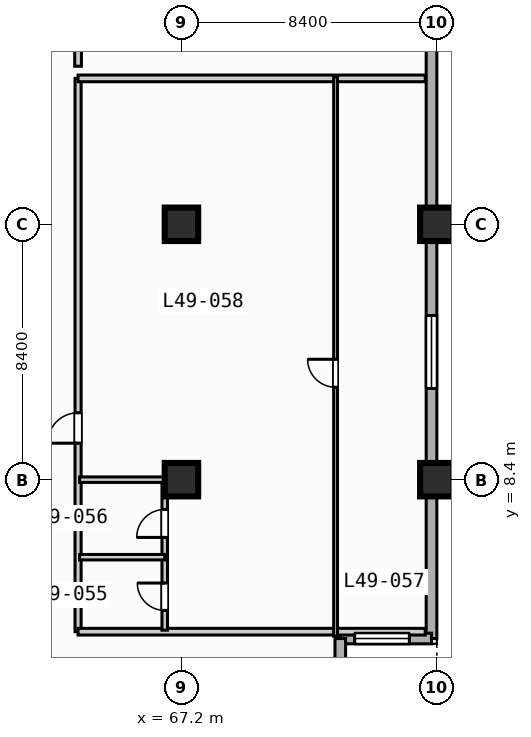
"""IFC4 building model, lengths in metres.
Left out: names, types, materials, properties, quantities, classifications, styles, units other than length and angle.
Written with IfcOpenShell. Run it as: python <this file> out.ifc"""

import sys

from ifc_helpers import new_model, si_unit, direction, frame, frame_2d, origin, origin_2d, place, context, subcontext, project, spatial, rectangle, extrude, element, fill, save


model = new_model("IFC4")
c1 = context("Model", 3, precision=1e-05, world=origin(), true_north=direction((0.0, 1.0)))
c2 = subcontext(c1, "Body", "Model", "MODEL_VIEW")
j1 = project(units=[si_unit("LENGTHUNIT", "METRE"), si_unit("PLANEANGLEUNIT", "RADIAN")], contexts=[c1])
p1 = place(None, origin())
s1 = spatial("IfcSite", under=j1, at=p1, CompositionType="ELEMENT")
p2 = place(p1, origin())
s2 = spatial("IfcBuilding", under=s1, at=p2, CompositionType="ELEMENT")
p3 = place(p2, frame((0.0, 0.0, 201.3)))
s3 = spatial("IfcBuildingStorey", under=s2, at=p3, CompositionType="ELEMENT", Elevation=201.3)
for number, where, z_axis, x_axis in (
    (1, (67.2, 8.4, 0.0), (0.0, 0.0, 1.0), (1.0, 0.0, 0.0)),
    (2, (67.2, 16.8, 0.0), (0.0, 0.0, 1.0), (1.0, 0.0, 0.0)),
    (3, (75.6, 8.4, 0.0), (0.0, 0.0, 1.0), (1.0, 0.0, 0.0)),
    (4, (75.6, 16.8, 0.0), (0.0, 0.0, 1.0), (1.0, 0.0, 0.0)),
):
    element("IfcColumn", number, at=place(p3, frame(where, z_axis=z_axis, x_axis=x_axis)), inside=s3, PredefinedType="COLUMN", context=c2, shape_type="SweptSolid", body=[
        extrude(rectangle(XDim=1.1, YDim=1.1, at=origin_2d()), origin(), (0.0, 0.0, 1.0), 3.7),
    ])
p4 = place(p3, frame((75.425, 30.425, 0.0), z_axis=(0.0, 0.0, 1.0), x_axis=(0.0, -1.0, 0.0)))
e5 = element("IfcWall", 5, at=p4, inside=s3, PredefinedType="STANDARD", context=c2, shape_type="SweptSolid", body=[
    extrude(rectangle(XDim=27.25, YDim=0.35, at=frame_2d((13.625, 0.0))), origin(), (0.0, 0.0, 1.0), 3.47),
])
p5 = place(p4, frame((16.625, 0.0, 0.85)))
e6 = element("IfcOpeningElement", 6, at=p5, cuts=e5, PredefinedType="OPENING", context=c2, shape_type="SweptSolid", body=[
    extrude(rectangle(XDim=2.4, YDim=1.95, at=frame_2d((1.2, 0.975))), frame((0.0, 0.185, 0.0), z_axis=(0.0, -1.0, 0.0), x_axis=(1.0, 0.0, 0.0)), (0.0, 0.0, 1.0), 0.37),
])
p6 = place(p3, frame((75.425, 3.175, 0.0), z_axis=(0.0, 0.0, 1.0), x_axis=(-1.0, 0.0, 0.0)))
e7 = element("IfcWall", 7, at=p6, inside=s3, PredefinedType="STANDARD", context=c2, shape_type="SweptSolid", body=[
    extrude(rectangle(XDim=3.0, YDim=0.35, at=frame_2d((1.5, 0.0))), origin(), (0.0, 0.0, 1.0), 3.47),
])
p7 = place(p6, frame((0.728, 0.0, 0.85)))
e8 = element("IfcOpeningElement", 8, at=p7, cuts=e7, PredefinedType="OPENING", context=c2, shape_type="SweptSolid", body=[
    extrude(rectangle(XDim=1.8, YDim=1.8, at=frame_2d((0.9, 0.9))), frame((0.0, 0.185, 0.0), z_axis=(0.0, -1.0, 0.0), x_axis=(1.0, 0.0, 0.0)), (0.0, 0.0, 1.0), 0.37),
])
p8 = place(p3, frame((72.425, 3.175, 0.0), z_axis=(0.0, 0.0, 1.0), x_axis=(0.0, -1.0, 0.0)))
e9 = element("IfcWall", 9, at=p8, inside=s3, PredefinedType="STANDARD", context=c2, shape_type="SweptSolid", body=[
    extrude(rectangle(XDim=3.0, YDim=0.35, at=frame_2d((1.5, 0.0))), origin(), (0.0, 0.0, 1.0), 3.47),
])
p9 = place(p3, frame((63.8, 3.4, 0.0), z_axis=(0.0, 0.0, 1.0), x_axis=(0.0, 1.0, 0.0)))
e10 = element("IfcWall", 10, at=p9, inside=s3, PredefinedType="PARTITIONING", context=c2, shape_type="SweptSolid", body=[
    extrude(rectangle(XDim=18.2, YDim=0.2, at=frame_2d((9.1, 0.0))), origin(), (0.0, 0.0, 1.0), 3.47),
])
p10 = place(p9, frame((6.2, 0.0, 0.0)))
e11 = element("IfcOpeningElement", 11, at=p10, cuts=e10, PredefinedType="OPENING", context=c2, shape_type="SweptSolid", body=[
    extrude(rectangle(XDim=1.0, YDim=2.15, at=frame_2d((0.5, 1.075))), frame((0.0, 0.11, 0.0), z_axis=(0.0, -1.0, 0.0), x_axis=(1.0, 0.0, 0.0)), (0.0, 0.0, 1.0), 0.22),
])
for number, where, z_axis, x_axis in (
    (12, (63.8, 3.4, 0.0), (0.0, 0.0, 1.0), (1.0, 0.0, 0.0)),
    (13, (63.8, 21.6, 0.0), (0.0, 0.0, 1.0), (1.0, 0.0, 0.0)),
):
    element("IfcWall", number, at=place(p3, frame(where, z_axis=z_axis, x_axis=x_axis)), inside=s3, PredefinedType="PARTITIONING", context=c2, shape_type="SweptSolid", body=[
        extrude(rectangle(XDim=11.42, YDim=0.22, at=frame_2d((5.71, 0.0))), origin(), (0.0, 0.0, 1.0), 3.47),
    ])
p11 = place(p3, frame((66.65, 3.45, 0.0), z_axis=(0.0, 0.0, 1.0), x_axis=(0.0, 1.0, 0.0)))
e14 = element("IfcWall", 14, at=p11, inside=s3, PredefinedType="PLUMBINGWALL", context=c2, shape_type="SweptSolid", body=[
    extrude(rectangle(XDim=4.95, YDim=0.18, at=frame_2d((2.475, 0.0))), origin(), (0.0, 0.0, 1.0), 3.47),
])
p12 = place(p11, frame((0.65, 0.0, 0.0)))
e15 = element("IfcOpeningElement", 15, at=p12, cuts=e14, PredefinedType="OPENING", context=c2, shape_type="SweptSolid", body=[
    extrude(rectangle(XDim=0.9, YDim=2.1, at=frame_2d((0.45, 1.05))), frame((0.0, 0.1, 0.0), z_axis=(0.0, -1.0, 0.0), x_axis=(1.0, 0.0, 0.0)), (0.0, 0.0, 1.0), 0.2),
])
p13 = place(p11, frame((3.05, 0.0, 0.0)))
e16 = element("IfcOpeningElement", 16, at=p13, cuts=e14, PredefinedType="OPENING", context=c2, shape_type="SweptSolid", body=[
    extrude(rectangle(XDim=0.92, YDim=2.1, at=frame_2d((0.46, 1.05))), frame((0.0, 0.1, 0.0), z_axis=(0.0, -1.0, 0.0), x_axis=(1.0, 0.0, 0.0)), (0.0, 0.0, 1.0), 0.2),
])
p14 = place(p3, frame((63.85, 5.85, 0.0), z_axis=(0.0, 0.0, 1.0), x_axis=(1.0, 0.0, 0.0)))
e17 = element("IfcWall", 17, at=p14, inside=s3, PredefinedType="PLUMBINGWALL", context=c2, shape_type="SweptSolid", body=[
    extrude(rectangle(XDim=2.8, YDim=0.18, at=frame_2d((1.4, 0.0))), origin(), (0.0, 0.0, 1.0), 3.47),
])
p15 = place(p3, frame((63.85, 8.4, 0.0), z_axis=(0.0, 0.0, 1.0), x_axis=(1.0, 0.0, 0.0)))
e18 = element("IfcWall", 18, at=p15, inside=s3, PredefinedType="PLUMBINGWALL", context=c2, shape_type="SweptSolid", body=[
    extrude(rectangle(XDim=2.8, YDim=0.18, at=frame_2d((1.4, 0.0))), origin(), (0.0, 0.0, 1.0), 2.853),
])
p16 = place(p3, frame((72.27, 3.25, 0.0), z_axis=(0.0, 0.0, 1.0), x_axis=(0.0, 1.0, 0.0)))
e19 = element("IfcWall", 19, at=p16, inside=s3, PredefinedType="PARTITIONING", context=c2, shape_type="SweptSolid", body=[
    extrude(rectangle(XDim=18.4, YDim=0.125, at=frame_2d((9.2, 0.0))), origin(), (0.0, 0.0, 1.0), 3.47),
])
p17 = place(p16, frame((8.19, 0.0, 0.0)))
e20 = element("IfcOpeningElement", 20, at=p17, cuts=e19, PredefinedType="OPENING", context=c2, shape_type="SweptSolid", body=[
    extrude(rectangle(XDim=0.92, YDim=2.1, at=frame_2d((0.46, 1.05))), frame((0.0, 0.073, 0.0), z_axis=(0.0, -1.0, 0.0), x_axis=(1.0, 0.0, 0.0)), (0.0, 0.0, 1.0), 0.145),
])
p18 = place(p3, frame((63.8, 22.0, 0.0), z_axis=(0.0, 0.0, 1.0), x_axis=(0.0, 1.0, 0.0)))
e21 = element("IfcWall", 21, at=p18, inside=s3, PredefinedType="PARTITIONING", context=c2, shape_type="SweptSolid", body=[
    extrude(rectangle(XDim=6.0, YDim=0.22, at=frame_2d((3.0, 0.0))), origin(), (0.0, 0.0, 1.0), 3.47),
])
p19 = place(p5, origin())
e22 = element("IfcWindow", 22, at=p19, inside=s3, PartitioningType="SINGLE_PANEL", PredefinedType="WINDOW", context=c2, shape_type="SweptSolid", body=[
    extrude(rectangle(XDim=2.4, YDim=1.95, at=frame_2d((1.2, 0.975))), frame((0.0, 0.03, 0.0), z_axis=(0.0, -1.0, 0.0), x_axis=(1.0, 0.0, 0.0)), (0.0, 0.0, 1.0), 0.06),
])
fill(e6, e22)
p20 = place(p7, origin())
e23 = element("IfcWindow", 23, at=p20, inside=s3, PartitioningType="SINGLE_PANEL", PredefinedType="WINDOW", context=c2, shape_type="SweptSolid", body=[
    extrude(rectangle(XDim=1.8, YDim=1.8, at=frame_2d((0.9, 0.9))), frame((0.0, 0.03, 0.0), z_axis=(0.0, -1.0, 0.0), x_axis=(1.0, 0.0, 0.0)), (0.0, 0.0, 1.0), 0.06),
])
fill(e8, e23)
p21 = place(p10, origin())
e24 = element("IfcDoor", 24, at=p21, inside=s3, OperationType="SINGLE_SWING_LEFT", PredefinedType="DOOR", context=c2, shape_type="SweptSolid", body=[
    extrude(rectangle(XDim=1.0, YDim=2.15, at=frame_2d((0.5, 1.075))), frame((0.0, 0.025, 0.0), z_axis=(0.0, -1.0, 0.0), x_axis=(1.0, 0.0, 0.0)), (0.0, 0.0, 1.0), 0.05),
])
fill(e11, e24)
p22 = place(p12, origin())
e25 = element("IfcDoor", 25, at=p22, inside=s3, OperationType="SINGLE_SWING_RIGHT", PredefinedType="DOOR", context=c2, shape_type="SweptSolid", body=[
    extrude(rectangle(XDim=0.9, YDim=2.1, at=frame_2d((0.45, 1.05))), frame((0.0, 0.025, 0.0), z_axis=(0.0, -1.0, 0.0), x_axis=(1.0, 0.0, 0.0)), (0.0, 0.0, 1.0), 0.05),
])
fill(e15, e25)
p23 = place(p13, origin())
e26 = element("IfcDoor", 26, at=p23, inside=s3, OperationType="SINGLE_SWING_LEFT", PredefinedType="DOOR", context=c2, shape_type="SweptSolid", body=[
    extrude(rectangle(XDim=0.92, YDim=2.1, at=frame_2d((0.46, 1.05))), frame((0.0, 0.025, 0.0), z_axis=(0.0, -1.0, 0.0), x_axis=(1.0, 0.0, 0.0)), (0.0, 0.0, 1.0), 0.05),
])
fill(e16, e26)
p24 = place(p17, origin())
e27 = element("IfcDoor", 27, at=p24, inside=s3, OperationType="SINGLE_SWING_RIGHT", PredefinedType="DOOR", context=c2, shape_type="SweptSolid", body=[
    extrude(rectangle(XDim=0.92, YDim=2.1, at=frame_2d((0.46, 1.05))), frame((0.0, 0.025, 0.0), z_axis=(0.0, -1.0, 0.0), x_axis=(1.0, 0.0, 0.0)), (0.0, 0.0, 1.0), 0.05),
])
fill(e20, e27)
save(model, sys.argv[1])
